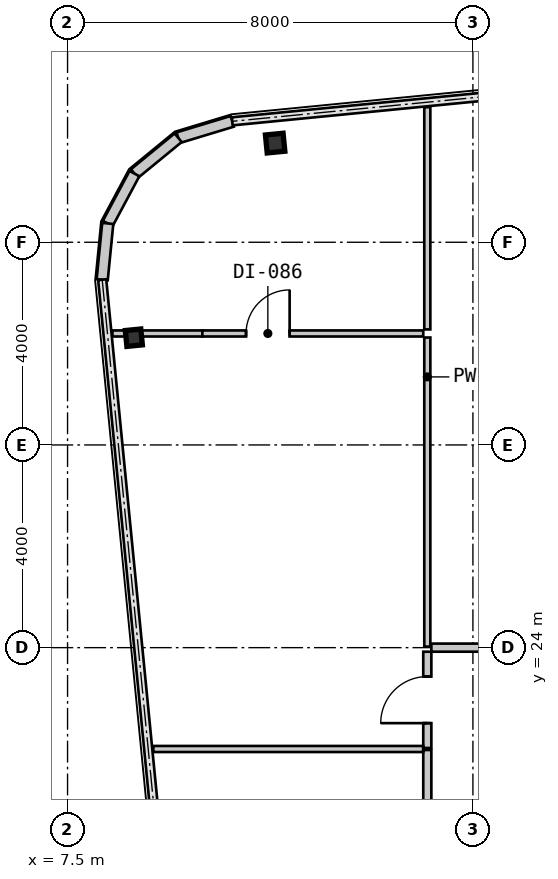
"""IFC4 building model, lengths in metres.
Left out: names, types, materials, properties, quantities, classifications, styles, units other than length and angle.
Written with IfcOpenShell. Run it as: python <this file> out.ifc"""

import sys

from ifc_helpers import new_model, si_unit, direction, frame, frame_2d, origin, origin_2d, place, context, subcontext, project, spatial, rectangle, i_section, extrude, source, transform, mapped, element, fill, save


model = new_model("IFC4")
c1 = context("Model", 3, precision=1e-05, world=origin(), true_north=direction((0.0, 1.0)))
c2 = subcontext(c1, "Body", "Model", "MODEL_VIEW")
j1 = project(units=[si_unit("LENGTHUNIT", "METRE"), si_unit("PLANEANGLEUNIT", "RADIAN")], contexts=[c1])
p1 = place(None, origin())
s1 = spatial("IfcSite", under=j1, at=p1, CompositionType="ELEMENT")
p2 = place(p1, origin())
s2 = spatial("IfcBuilding", under=s1, at=p2, CompositionType="ELEMENT")
p3 = place(p2, frame((0.0, 0.0, 74.55)))
s3 = spatial("IfcBuildingStorey", under=s2, at=p3, CompositionType="ELEMENT", Elevation=74.55)
m1 = source(origin(), c2, "Body", "SweptSolid", [
    extrude(i_section(OverallWidth=0.35, OverallDepth=0.356, WebThickness=0.018, FlangeThickness=0.028, at=origin_2d()), origin(), (0.0, 0.0, 1.0), 3.15),
])
p4 = place(p3, frame((11.597, 33.957, 0.0), z_axis=(0.0, 0.0, 1.0), x_axis=(0.995227399982, 0.097582899759, 0.0)))
e1 = element("IfcColumn", 1, at=p4, inside=s3, PredefinedType="COLUMN", context=c2, shape_type="MappedRepresentation", body=[
    mapped(m1, transform((0.0, 0.0, 0.0), scale=1.0)),
])
m2 = source(origin(), c2, "Body", "SweptSolid", [
    extrude(i_section(OverallWidth=0.307, OverallDepth=0.315, WebThickness=0.012, FlangeThickness=0.019, at=origin_2d()), origin(), (0.0, 0.0, 1.0), 3.15),
])
p5 = place(p3, frame((8.808, 30.116, 0.0), z_axis=(0.0, 0.0, 1.0), x_axis=(0.995227399982, 0.097582899759, 0.0)))
e2 = element("IfcColumn", 2, at=p5, inside=s3, PredefinedType="COLUMN", context=c2, shape_type="MappedRepresentation", body=[
    mapped(m2, transform((0.0, 0.0, 0.0), scale=1.0)),
])
m3 = source(origin(), c2, "Body", "SweptSolid", [
    extrude(rectangle(XDim=1.116, YDim=0.22, at=frame_2d((0.558, 0.0))), origin(), (0.0, 0.0, 1.0), 2.93),
])
p6 = place(p3, frame((10.751, 34.386, 0.0), z_axis=(0.0, 0.0, 1.0), x_axis=(-0.957070388811, -0.289855603468, 0.0)))
e3 = element("IfcWall", 3, at=p6, inside=s3, PredefinedType="SOLIDWALL", context=c2, shape_type="MappedRepresentation", body=[
    mapped(m3, transform((0.0, 0.0, 0.0), scale=1.0)),
])
m4 = source(origin(), c2, "Body", "SweptSolid", [
    extrude(rectangle(XDim=1.116, YDim=0.22, at=frame_2d((0.558, 0.0))), origin(), (0.0, 0.0, 1.0), 2.93),
])
p7 = place(p3, frame((9.683, 34.063, 0.0), z_axis=(0.0, 0.0, 1.0), x_axis=(-0.773254916409, -0.634095287989, 0.0)))
e4 = element("IfcWall", 4, at=p7, inside=s3, PredefinedType="SOLIDWALL", context=c2, shape_type="MappedRepresentation", body=[
    mapped(m4, transform((0.0, 0.0, 0.0), scale=1.0)),
])
m5 = source(origin(), c2, "Body", "SweptSolid", [
    extrude(rectangle(XDim=1.116, YDim=0.22, at=frame_2d((0.558, 0.0))), origin(), (0.0, 0.0, 1.0), 2.93),
])
p8 = place(p3, frame((8.82, 33.355, 0.0), z_axis=(0.0, 0.0, 1.0), x_axis=(-0.471802540493, -0.881704237704, 0.0)))
e5 = element("IfcWall", 5, at=p8, inside=s3, PredefinedType="SOLIDWALL", context=c2, shape_type="MappedRepresentation", body=[
    mapped(m5, transform((0.0, 0.0, 0.0), scale=1.0)),
])
p9 = place(p3, frame((8.293, 32.371, 0.0), z_axis=(0.0, 0.0, 1.0), x_axis=(-0.098463783145, -0.99514063499, 0.0)))
e6 = element("IfcWall", 6, at=p9, inside=s3, PredefinedType="SOLIDWALL", context=c2, shape_type="MappedRepresentation", body=[
    mapped(m4, transform((0.0, 0.0, 0.0), scale=1.0)),
])
m6 = source(origin(), c2, "Body", "SweptSolid", [
    extrude(rectangle(XDim=11.201, YDim=0.16, at=frame_2d((5.601, 0.0))), origin(), (0.0, 0.0, 1.0), 2.93),
])
p10 = place(p3, frame((14.6, 10.778, 0.0), z_axis=(0.0, 0.0, 1.0), x_axis=(0.0, 1.0, 0.0)))
e7 = element("IfcWall", 7, at=p10, inside=s3, PredefinedType="PARTITIONING", context=c2, shape_type="MappedRepresentation", body=[
    mapped(m6, transform((0.0, 0.0, 0.0), scale=1.0)),
])
m7 = source(origin(), c2, "Body", "SweptSolid", [
    extrude(rectangle(XDim=0.92, YDim=2.1, at=frame_2d((0.46, 1.05))), frame((0.0, 0.09, 0.0), z_axis=(0.0, -1.0, 0.0), x_axis=(1.0, 0.0, 0.0)), (0.0, 0.0, 1.0), 0.18),
])
p11 = place(p10, frame((4.392, 0.0, 0.0)))
e8 = element("IfcOpeningElement", 8, at=p11, cuts=e7, PredefinedType="OPENING", context=c2, shape_type="MappedRepresentation", body=[
    mapped(m7, transform((0.0, 0.0, 0.0), scale=1.0)),
])
m8 = source(origin(), c2, "Body", "SweptSolid", [
    extrude(rectangle(XDim=1.9, YDim=0.16, at=frame_2d((0.95, 0.0))), origin(), (0.0, 0.0, 1.0), 2.93),
])
p12 = place(p3, frame((14.6, 22.02, 0.0), z_axis=(0.0, 0.0, 1.0), x_axis=(0.0, 1.0, 0.0)))
e9 = element("IfcWall", 9, at=p12, inside=s3, PredefinedType="PARTITIONING", context=c2, shape_type="MappedRepresentation", body=[
    mapped(m8, transform((0.0, 0.0, 0.0), scale=1.0)),
])
p13 = place(p12, frame((0.49, 0.0, 0.0)))
e10 = element("IfcOpeningElement", 10, at=p13, cuts=e9, PredefinedType="OPENING", context=c2, shape_type="MappedRepresentation", body=[
    mapped(m7, transform((0.0, 0.0, 0.0), scale=1.0)),
])
m9 = source(origin(), c2, "Body", "SweptSolid", [
    extrude(rectangle(XDim=4.17, YDim=0.16, at=frame_2d((2.085, 0.0))), origin(), (0.0, 0.0, 1.0), 2.93),
])
p14 = place(p3, frame((14.68, 24.0, 0.0), z_axis=(0.0, 0.0, 1.0), x_axis=(1.0, 0.0, 0.0)))
e11 = element("IfcWall", 11, at=p14, inside=s3, PredefinedType="PARTITIONING", context=c2, shape_type="MappedRepresentation", body=[
    mapped(m9, transform((0.0, 0.0, 0.0), scale=1.0)),
])
p15 = place(p14, frame((1.69, 0.0, 0.0)))
e12 = element("IfcOpeningElement", 12, at=p15, cuts=e11, PredefinedType="OPENING", context=c2, shape_type="MappedRepresentation", body=[
    mapped(m7, transform((0.0, 0.0, 0.0), scale=1.0)),
])
m10 = source(origin(), c2, "Body", "SweptSolid", [
    extrude(rectangle(XDim=5.326, YDim=0.12, at=frame_2d((2.663, 0.0))), origin(), (0.0, 0.0, 1.0), 2.93),
])
p16 = place(p3, frame((9.192, 22.0, 0.0), z_axis=(0.0, 0.0, 1.0), x_axis=(1.0, 0.0, 0.0)))
e13 = element("IfcWall", 13, at=p16, inside=s3, PredefinedType="PARTITIONING", context=c2, shape_type="MappedRepresentation", body=[
    mapped(m10, transform((0.0, 0.0, 0.0), scale=1.0)),
])
m11 = source(origin(), c2, "Body", "SweptSolid", [
    extrude(rectangle(XDim=0.403, YDim=0.12, at=frame_2d((0.202, 0.0))), origin(), (0.0, 0.0, 1.0), 2.93),
])
p17 = place(p3, frame((8.386, 30.2, 0.0), z_axis=(0.0, 0.0, 1.0), x_axis=(1.0, 0.0, 0.0)))
e14 = element("IfcWall", 14, at=p17, inside=s3, PredefinedType="PARTITIONING", context=c2, shape_type="MappedRepresentation", body=[
    mapped(m11, transform((0.0, 0.0, 0.0), scale=1.0)),
])
m12 = source(origin(), c2, "Body", "SweptSolid", [
    extrude(rectangle(XDim=1.371, YDim=0.12, at=frame_2d((0.686, 0.0))), origin(), (0.0, 0.0, 1.0), 2.397),
])
p18 = place(p3, frame((8.789, 30.2, 0.0), z_axis=(0.0, 0.0, 1.0), x_axis=(1.0, 0.0, 0.0)))
e15 = element("IfcWall", 15, at=p18, inside=s3, PredefinedType="PARTITIONING", context=c2, shape_type="MappedRepresentation", body=[
    mapped(m12, transform((0.0, 0.0, 0.0), scale=1.0)),
])
m13 = source(origin(), c2, "Body", "SweptSolid", [
    extrude(rectangle(XDim=4.36, YDim=0.12, at=frame_2d((2.18, 0.0))), origin(), (0.0, 0.0, 1.0), 2.93),
])
p19 = place(p3, frame((10.16, 30.2, 0.0), z_axis=(0.0, 0.0, 1.0), x_axis=(1.0, 0.0, 0.0)))
e16 = element("IfcWall", 16, at=p19, inside=s3, PredefinedType="PARTITIONING", context=c2, shape_type="MappedRepresentation", body=[
    mapped(m13, transform((0.0, 0.0, 0.0), scale=1.0)),
])
m14 = source(origin(), c2, "Body", "SweptSolid", [
    extrude(rectangle(XDim=0.86, YDim=2.1, at=frame_2d((0.43, 1.05))), frame((0.0, 0.07, 0.0), z_axis=(0.0, -1.0, 0.0), x_axis=(1.0, 0.0, 0.0)), (0.0, 0.0, 1.0), 0.14),
])
p20 = place(p19, frame((0.863, 0.0, 0.0)))
e17 = element("IfcOpeningElement", 17, at=p20, cuts=e16, PredefinedType="OPENING", context=c2, shape_type="MappedRepresentation", body=[
    mapped(m14, transform((0.0, 0.0, 0.0), scale=1.0)),
])
m15 = source(origin(), c2, "Body", "SweptSolid", [
    extrude(rectangle(XDim=6.1, YDim=0.12, at=frame_2d((3.05, 0.0))), origin(), (0.0, 0.0, 1.0), 2.93),
])
p21 = place(p3, frame((14.6, 30.12, 0.0), z_axis=(0.0, 0.0, 1.0), x_axis=(0.0, -1.0, 0.0)))
e18 = element("IfcWall", 18, at=p21, inside=s3, PredefinedType="PARTITIONING", context=c2, shape_type="MappedRepresentation", body=[
    mapped(m15, transform((0.0, 0.0, 0.0), scale=1.0)),
])
m16 = source(origin(), c2, "Body", "SweptSolid", [
    extrude(rectangle(XDim=4.385, YDim=0.12, at=frame_2d((2.193, 0.0))), origin(), (0.0, 0.0, 1.0), 2.93),
])
p22 = place(p3, frame((14.6, 34.666, 0.0), z_axis=(0.0, 0.0, 1.0), x_axis=(0.0, -1.0, 0.0)))
e19 = element("IfcWall", 19, at=p22, inside=s3, PredefinedType="PARTITIONING", context=c2, shape_type="MappedRepresentation", body=[
    mapped(m16, transform((0.0, 0.0, 0.0), scale=1.0)),
])
m17 = source(origin(), c2, "Body", "SweptSolid", [
    extrude(rectangle(XDim=0.92, YDim=2.1, at=frame_2d((0.46, 1.05))), frame((0.0, 0.025, 0.0), z_axis=(0.0, -1.0, 0.0), x_axis=(1.0, 0.0, 0.0)), (0.0, 0.0, 1.0), 0.05),
])
p23 = place(p13, origin())
e20 = element("IfcDoor", 20, at=p23, inside=s3, OperationType="SINGLE_SWING_LEFT", PredefinedType="DOOR", context=c2, shape_type="MappedRepresentation", body=[
    mapped(m17, transform((0.0, 0.0, 0.0), scale=1.0)),
])
fill(e10, e20)
m18 = source(origin(), c2, "Body", "SweptSolid", [
    extrude(rectangle(XDim=0.86, YDim=2.1, at=frame_2d((0.43, 1.05))), frame((0.0, 0.025, 0.0), z_axis=(0.0, -1.0, 0.0), x_axis=(1.0, 0.0, 0.0)), (0.0, 0.0, 1.0), 0.05),
])
p24 = place(p20, origin())
e21 = element("IfcDoor", 21, at=p24, inside=s3, OperationType="SINGLE_SWING_RIGHT", PredefinedType="DOOR", context=c2, shape_type="MappedRepresentation", body=[
    mapped(m18, transform((0.0, 0.0, 0.0), scale=1.0)),
])
fill(e17, e21)
save(model, sys.argv[1])
